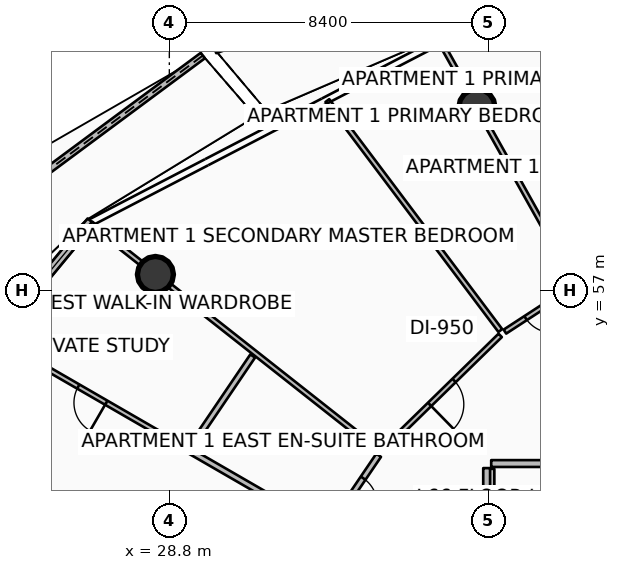
"""IFC4 building model, lengths in metres.
Left out: names, types, materials, properties, quantities, classifications, styles, units other than length and angle.
Written with IfcOpenShell. Run it as: python <this file> out.ifc"""

import sys

from ifc_helpers import new_model, si_unit, direction, frame, frame_2d, origin, origin_2d, place, context, subcontext, project, spatial, polyline, rectangle, circle, outline, extrude, element, fill, save


model = new_model("IFC4")
c1 = context("Model", 3, precision=1e-05, world=origin(), true_north=direction((0.0, 1.0)))
c2 = subcontext(c1, "Body", "Model", "MODEL_VIEW")
j1 = project(units=[si_unit("LENGTHUNIT", "METRE"), si_unit("PLANEANGLEUNIT", "RADIAN")], contexts=[c1])
p1 = place(None, origin())
s1 = spatial("IfcSite", under=j1, at=p1, CompositionType="ELEMENT")
p2 = place(p1, origin())
s2 = spatial("IfcBuilding", under=s1, at=p2, CompositionType="ELEMENT")
p3 = place(p2, frame((0.0, 0.0, 263.65)))
s3 = spatial("IfcBuildingStorey", under=s2, at=p3, CompositionType="ELEMENT", Elevation=263.65)
for number, where, z_axis, x_axis in (
    (1, (36.895, 61.83, 0.0), (0.0, 0.0, 1.0), (1.0, 0.0, 0.0)),
    (2, (28.434, 57.425, 0.0), (0.0, 0.0, 1.0), (1.0, 0.0, 0.0)),
):
    element("IfcColumn", number, at=place(p3, frame(where, z_axis=z_axis, x_axis=x_axis)), inside=s3, PredefinedType="COLUMN", context=c2, shape_type="SweptSolid", body=[
        extrude(circle(Radius=0.475, at=origin_2d()), origin(), (0.0, 0.0, 1.0), 3.59),
    ])
p4 = place(p3, frame((39.827, 66.766, 0.0), z_axis=(0.0, 0.0, 1.0), x_axis=(-0.944003849273, -0.329934436757, 0.0)))
e3 = element("IfcWall", 3, at=p4, inside=s3, PredefinedType="PARAPET", context=c2, shape_type="SweptSolid", body=[
    extrude(outline(polyline([(0.0, 0.0), (10.406, 0.0), (10.406, 1.483), (5.203, 1.284), (0.0, 1.148), (0.0, 0.0)])), frame((0.0, 0.09, 0.0), z_axis=(0.0, -1.0, 0.0), x_axis=(1.0, 0.0, 0.0)), (0.0, 0.0, 1.0), 0.18),
])
p5 = place(p3, frame((29.681, 63.185, 0.0), z_axis=(0.0, 0.0, 1.0), x_axis=(-0.803330402034, -0.59553359701, 0.0)))
e4 = element("IfcWall", 4, at=p5, inside=s3, PredefinedType="PARAPET", context=c2, shape_type="SweptSolid", body=[
    extrude(outline(polyline([(0.0, 0.0), (11.674, 0.0), (11.674, 1.832), (5.837, 1.696), (0.0, 1.497), (0.0, 0.0)])), frame((0.0, 0.09, 0.0), z_axis=(0.0, -1.0, 0.0), x_axis=(1.0, 0.0, 0.0)), (0.0, 0.0, 1.0), 0.18),
])
p6 = place(p3, frame((26.742, 58.822, 0.0), z_axis=(0.0, 0.0, 1.0), x_axis=(-0.636680093065, -0.771128043255, 0.0)))
e5 = element("IfcWall", 5, at=p6, inside=s3, PredefinedType="SOLIDWALL", context=c2, shape_type="SweptSolid", body=[
    extrude(rectangle(XDim=11.438, YDim=0.24, at=frame_2d((5.719, 0.0))), origin(), (0.0, 0.0, 1.0), 2.54),
])
p7 = place(p6, frame((9.218, 0.0, 0.0)))
e6 = element("IfcOpeningElement", 6, at=p7, cuts=e5, PredefinedType="OPENING", context=c2, shape_type="SweptSolid", body=[
    extrude(rectangle(XDim=1.45, YDim=2.15, at=frame_2d((0.725, 1.075))), frame((0.0, 0.13, 0.0), z_axis=(0.0, -1.0, 0.0), x_axis=(1.0, 0.0, 0.0)), (0.0, 0.0, 1.0), 0.26),
])
p8 = place(p6, frame((0.28, 0.0, 0.65)))
e7 = element("IfcOpeningElement", 7, at=p8, cuts=e5, PredefinedType="OPENING", context=c2, shape_type="SweptSolid", body=[
    extrude(rectangle(XDim=1.6, YDim=1.5, at=frame_2d((0.8, 0.75))), frame((0.0, 0.13, 0.0), z_axis=(0.0, -1.0, 0.0), x_axis=(1.0, 0.0, 0.0)), (0.0, 0.0, 1.0), 0.26),
])
p9 = place(p3, frame((37.29, 50.77, 0.0), z_axis=(0.0, 0.0, 1.0), x_axis=(0.0, 1.0, 0.0)))
e8 = element("IfcWall", 8, at=p9, inside=s3, PredefinedType="PARTITIONING", context=c2, shape_type="SweptSolid", body=[
    extrude(rectangle(XDim=1.54, YDim=0.125, at=frame_2d((0.77, 0.0))), origin(), (0.0, 0.0, 1.0), 3.03),
])
p10 = place(p3, frame((42.028, 52.45, 0.0), z_axis=(0.0, 0.0, 1.0), x_axis=(-1.0, 0.0, 0.0)))
e9 = element("IfcWall", 9, at=p10, inside=s3, PredefinedType="PARTITIONING", context=c2, shape_type="SweptSolid", body=[
    extrude(rectangle(XDim=4.758, YDim=0.18, at=frame_2d((2.379, 0.0))), origin(), (0.0, 0.0, 1.0), 2.957),
])
p11 = place(p3, frame((37.15, 52.33, 0.0), z_axis=(0.0, 0.0, 1.0), x_axis=(0.0, -1.0, 0.0)))
e10 = element("IfcWall", 10, at=p11, inside=s3, PredefinedType="PARTITIONING", context=c2, shape_type="SweptSolid", body=[
    extrude(rectangle(XDim=1.656, YDim=0.18, at=frame_2d((0.828, 0.0))), origin(), (0.0, 0.0, 1.0), 2.957),
])
p12 = place(p3, frame((39.467, 57.237, 0.0), z_axis=(0.0, 0.0, 1.0), x_axis=(-0.488642985948, 0.872483829239, 0.0)))
e11 = element("IfcWall", 11, at=p12, inside=s3, PredefinedType="PARTITIONING", context=c2, shape_type="SweptSolid", body=[
    extrude(rectangle(XDim=7.131, YDim=0.125, at=frame_2d((3.565, 0.0))), origin(), (0.0, 0.0, 1.0), 2.957),
])
p13 = place(p3, frame((37.509, 55.949, 0.0), z_axis=(0.0, 0.0, 1.0), x_axis=(-0.60104674722, 0.799213868534, 0.0)))
e12 = element("IfcWall", 12, at=p13, inside=s3, PredefinedType="PARTITIONING", context=c2, shape_type="SweptSolid", body=[
    extrude(rectangle(XDim=7.572, YDim=0.125, at=frame_2d((3.786, 0.0))), origin(), (0.0, 0.0, 1.0), 3.03),
])
p14 = place(p3, frame((39.432, 57.095, 0.0), z_axis=(0.0, 0.0, 1.0), x_axis=(-0.837734795217, -0.546077295703, 0.0)))
e13 = element("IfcWall", 13, at=p14, inside=s3, PredefinedType="PARTITIONING", context=c2, shape_type="SweptSolid", body=[
    extrude(rectangle(XDim=2.15, YDim=0.125, at=frame_2d((1.075, 0.0))), origin(), (0.0, 0.0, 1.0), 2.957),
])
p15 = place(p14, frame((0.65, 0.0, 0.0)))
e14 = element("IfcOpeningElement", 14, at=p15, cuts=e13, PredefinedType="OPENING", context=c2, shape_type="SweptSolid", body=[
    extrude(rectangle(XDim=0.85, YDim=2.06, at=frame_2d((0.425, 1.03))), frame((0.0, 0.073, 0.0), z_axis=(0.0, -1.0, 0.0), x_axis=(1.0, 0.0, 0.0)), (0.0, 0.0, 1.0), 0.145),
])
p16 = place(p3, frame((37.506, 55.822, 0.0), z_axis=(0.0, 0.0, 1.0), x_axis=(-0.715105814901, -0.699016218334, 0.0)))
e15 = element("IfcWall", 15, at=p16, inside=s3, PredefinedType="PARTITIONING", context=c2, shape_type="SweptSolid", body=[
    extrude(rectangle(XDim=4.294, YDim=0.125, at=frame_2d((2.147, 0.0))), origin(), (0.0, 0.0, 1.0), 2.957),
])
p17 = place(p16, frame((1.697, 0.0, 0.0)))
e16 = element("IfcOpeningElement", 16, at=p17, cuts=e15, PredefinedType="OPENING", context=c2, shape_type="SweptSolid", body=[
    extrude(rectangle(XDim=0.9, YDim=2.08, at=frame_2d((0.45, 1.04))), frame((0.0, 0.073, 0.0), z_axis=(0.0, -1.0, 0.0), x_axis=(1.0, 0.0, 0.0)), (0.0, 0.0, 1.0), 0.145),
])
p18 = place(p3, frame((34.285, 52.812, 0.0), z_axis=(0.0, 0.0, 1.0), x_axis=(-0.785324921183, 0.619083813526, 0.0)))
e17 = element("IfcWall", 17, at=p18, inside=s3, PredefinedType="PARTITIONING", context=c2, shape_type="SweptSolid", body=[
    extrude(rectangle(XDim=9.621, YDim=0.125, at=frame_2d((4.811, 0.0))), origin(), (0.0, 0.0, 1.0), 2.957),
])
p19 = place(p3, frame((34.308, 52.667, 0.0), z_axis=(0.0, 0.0, 1.0), x_axis=(-0.561141072409, -0.827720180288, 0.0)))
e18 = element("IfcWall", 18, at=p19, inside=s3, PredefinedType="PARTITIONING", context=c2, shape_type="SweptSolid", body=[
    extrude(rectangle(XDim=2.303, YDim=0.15, at=frame_2d((1.152, 0.0))), origin(), (0.0, 0.0, 1.0), 2.957),
])
p20 = place(p19, frame((0.727, 0.0, 0.0)))
e19 = element("IfcOpeningElement", 19, at=p20, cuts=e18, PredefinedType="OPENING", context=c2, shape_type="SweptSolid", body=[
    extrude(rectangle(XDim=0.85, YDim=2.06, at=frame_2d((0.425, 1.03))), frame((0.0, 0.085, 0.0), z_axis=(0.0, -1.0, 0.0), x_axis=(1.0, 0.0, 0.0)), (0.0, 0.0, 1.0), 0.17),
])
p21 = place(p3, frame((30.994, 55.28, 0.0), z_axis=(0.0, 0.0, 1.0), x_axis=(-0.561093021969, -0.827752753361, 0.0)))
e20 = element("IfcWall", 20, at=p21, inside=s3, PredefinedType="PARTITIONING", context=c2, shape_type="SweptSolid", body=[
    extrude(rectangle(XDim=2.91, YDim=0.15, at=frame_2d((1.455, 0.0))), origin(), (0.0, 0.0, 1.0), 2.957),
])
p22 = place(p3, frame((32.887, 50.731, 0.0), z_axis=(0.0, 0.0, 1.0), x_axis=(-0.865897249189, 0.500221904605, 0.0)))
e21 = element("IfcWall", 21, at=p22, inside=s3, PredefinedType="PARTITIONING", context=c2, shape_type="SweptSolid", body=[
    extrude(rectangle(XDim=4.09, YDim=0.15, at=frame_2d((2.045, 0.0))), origin(), (0.0, 0.0, 1.0), 3.03),
])
p23 = place(p3, frame((29.233, 52.842, 0.0), z_axis=(0.0, 0.0, 1.0), x_axis=(-0.865885749935, 0.500241809588, 0.0)))
e22 = element("IfcWall", 22, at=p23, inside=s3, PredefinedType="PARTITIONING", context=c2, shape_type="SweptSolid", body=[
    extrude(rectangle(XDim=5.683, YDim=0.125, at=frame_2d((2.841, 0.0))), origin(), (0.0, 0.0, 1.0), 3.03),
])
p24 = place(p23, frame((2.417, 0.0, 0.0)))
e23 = element("IfcOpeningElement", 23, at=p24, cuts=e22, PredefinedType="OPENING", context=c2, shape_type="SweptSolid", body=[
    extrude(rectangle(XDim=0.85, YDim=2.06, at=frame_2d((0.425, 1.03))), frame((0.0, 0.073, 0.0), z_axis=(0.0, -1.0, 0.0), x_axis=(1.0, 0.0, 0.0)), (0.0, 0.0, 1.0), 0.145),
])
p25 = place(p3, frame((31.92, 48.787, 0.0), z_axis=(0.0, 0.0, 1.0), x_axis=(-0.92130726737, 0.388835336731, 0.0)))
e24 = element("IfcWall", 24, at=p25, inside=s3, PredefinedType="PARTITIONING", context=c2, shape_type="SweptSolid", body=[
    extrude(rectangle(XDim=10.712, YDim=0.125, at=frame_2d((5.356, 0.0))), origin(), (0.0, 0.0, 1.0), 3.03),
])
p26 = place(p8, origin())
e25 = element("IfcWindow", 25, at=p26, inside=s3, PartitioningType="SINGLE_PANEL", PredefinedType="WINDOW", context=c2, shape_type="SweptSolid", body=[
    extrude(rectangle(XDim=1.6, YDim=1.5, at=frame_2d((0.8, 0.75))), frame((0.0, 0.03, 0.0), z_axis=(0.0, -1.0, 0.0), x_axis=(1.0, 0.0, 0.0)), (0.0, 0.0, 1.0), 0.06),
])
fill(e7, e25)
p27 = place(p15, origin())
e26 = element("IfcDoor", 26, at=p27, inside=s3, OperationType="SINGLE_SWING_LEFT", PredefinedType="DOOR", context=c2, shape_type="SweptSolid", body=[
    extrude(rectangle(XDim=0.85, YDim=2.06, at=frame_2d((0.425, 1.03))), frame((0.0, 0.025, 0.0), z_axis=(0.0, -1.0, 0.0), x_axis=(1.0, 0.0, 0.0)), (0.0, 0.0, 1.0), 0.05),
])
fill(e14, e26)
p28 = place(p17, origin())
e27 = element("IfcDoor", 27, at=p28, inside=s3, OperationType="SINGLE_SWING_RIGHT", PredefinedType="DOOR", context=c2, shape_type="SweptSolid", body=[
    extrude(rectangle(XDim=0.9, YDim=2.08, at=frame_2d((0.45, 1.04))), frame((0.0, 0.025, 0.0), z_axis=(0.0, -1.0, 0.0), x_axis=(1.0, 0.0, 0.0)), (0.0, 0.0, 1.0), 0.05),
])
fill(e16, e27)
p29 = place(p20, origin())
e28 = element("IfcDoor", 28, at=p29, inside=s3, OperationType="SINGLE_SWING_RIGHT", PredefinedType="DOOR", context=c2, shape_type="SweptSolid", body=[
    extrude(rectangle(XDim=0.85, YDim=2.06, at=frame_2d((0.425, 1.03))), frame((0.0, 0.025, 0.0), z_axis=(0.0, -1.0, 0.0), x_axis=(1.0, 0.0, 0.0)), (0.0, 0.0, 1.0), 0.05),
])
fill(e19, e28)
p30 = place(p24, origin())
e29 = element("IfcDoor", 29, at=p30, inside=s3, OperationType="SINGLE_SWING_LEFT", PredefinedType="DOOR", context=c2, shape_type="SweptSolid", body=[
    extrude(rectangle(XDim=0.85, YDim=2.06, at=frame_2d((0.425, 1.03))), frame((0.0, 0.025, 0.0), z_axis=(0.0, -1.0, 0.0), x_axis=(1.0, 0.0, 0.0)), (0.0, 0.0, 1.0), 0.05),
])
fill(e23, e29)
save(model, sys.argv[1])
